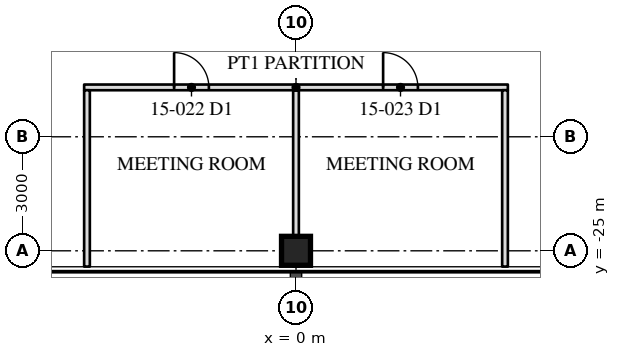
"""IFC4 building model, lengths in metres.
Left out: names, types, materials, properties, quantities, classifications, styles, units other than length and angle.
Written with IfcOpenShell. Run it as: python <this file> out.ifc"""

import sys

from ifc_helpers import new_model, si_unit, direction, frame, frame_2d, origin, origin_2d, place, context, subcontext, project, spatial, rectangle, hollow_rectangle, extrude, element, fill, save


model = new_model("IFC4")
c1 = context("Model", 3, precision=1e-05, world=origin(), true_north=direction((0.0, 1.0)))
c2 = subcontext(c1, "Body", "Model", "MODEL_VIEW")
j1 = project(units=[si_unit("LENGTHUNIT", "METRE"), si_unit("PLANEANGLEUNIT", "RADIAN")], contexts=[c1])
p1 = place(None, origin())
s1 = spatial("IfcSite", under=j1, at=p1, CompositionType="ELEMENT")
p2 = place(p1, origin())
s2 = spatial("IfcBuilding", under=s1, at=p2, CompositionType="ELEMENT")
p3 = place(p2, frame((0.0, 0.0, 65.2)))
s3 = spatial("IfcBuildingStorey", under=s2, at=p3, CompositionType="ELEMENT", Elevation=65.2)
p4 = place(p3, frame((0.0, -25.0, 0.0), z_axis=(0.0, 0.0, 1.0), x_axis=(1.0, 0.0, 0.0)))
e1 = element("IfcColumn", 1, at=p4, inside=s3, PredefinedType="COLUMN", context=c2, shape_type="SweptSolid", body=[
    extrude(hollow_rectangle(XDim=0.762, YDim=0.762, WallThickness=0.127, at=origin_2d()), origin(), (0.0, 0.0, 1.0), 4.1),
])
p5 = place(p3, frame((-5.575, -20.7, 0.0), z_axis=(0.0, 0.0, 1.0), x_axis=(1.0, 0.0, 0.0)))
e2 = element("IfcWall", 2, at=p5, inside=s3, PredefinedType="PARTITIONING", context=c2, shape_type="SweptSolid", body=[
    extrude(rectangle(XDim=11.15, YDim=0.15, at=frame_2d((5.575, 0.0))), origin(), (0.0, 0.0, 1.0), 3.91),
])
p6 = place(p5, frame((2.367, 0.0, 0.0)))
e3 = element("IfcOpeningElement", 3, at=p6, cuts=e2, PredefinedType="OPENING", context=c2, shape_type="SweptSolid", body=[
    extrude(rectangle(XDim=0.915, YDim=2.134, at=frame_2d((0.458, 1.067))), frame((0.0, 0.085, 0.0), z_axis=(0.0, -1.0, 0.0), x_axis=(1.0, 0.0, 0.0)), (0.0, 0.0, 1.0), 0.17),
])
p7 = place(p5, frame((7.867, 0.0, 0.0)))
e4 = element("IfcOpeningElement", 4, at=p7, cuts=e2, PredefinedType="OPENING", context=c2, shape_type="SweptSolid", body=[
    extrude(rectangle(XDim=0.915, YDim=2.134, at=frame_2d((0.458, 1.067))), frame((0.0, 0.085, 0.0), z_axis=(0.0, -1.0, 0.0), x_axis=(1.0, 0.0, 0.0)), (0.0, 0.0, 1.0), 0.17),
])
p8 = place(p3, frame((-5.5, -20.775, 0.0), z_axis=(0.0, 0.0, 1.0), x_axis=(0.0, -1.0, 0.0)))
e5 = element("IfcWall", 5, at=p8, inside=s3, PredefinedType="PARTITIONING", context=c2, shape_type="SweptSolid", body=[
    extrude(rectangle(XDim=4.64, YDim=0.15, at=frame_2d((2.32, 0.0))), origin(), (0.0, 0.0, 1.0), 3.91),
])
p9 = place(p3, frame((0.0, -20.775, 0.0), z_axis=(0.0, 0.0, 1.0), x_axis=(0.0, -1.0, 0.0)))
e6 = element("IfcWall", 6, at=p9, inside=s3, PredefinedType="PARTITIONING", context=c2, shape_type="SweptSolid", body=[
    extrude(rectangle(XDim=4.64, YDim=0.15, at=frame_2d((2.32, 0.0))), origin(), (0.0, 0.0, 1.0), 3.13),
])
p10 = place(p3, frame((5.5, -20.775, 0.0), z_axis=(0.0, 0.0, 1.0), x_axis=(0.0, -1.0, 0.0)))
e7 = element("IfcWall", 7, at=p10, inside=s3, PredefinedType="PARTITIONING", context=c2, shape_type="SweptSolid", body=[
    extrude(rectangle(XDim=4.64, YDim=0.15, at=frame_2d((2.32, 0.0))), origin(), (0.0, 0.0, 1.0), 3.91),
])
p11 = place(p6, origin())
e8 = element("IfcDoor", 8, at=p11, inside=s3, OperationType="SINGLE_SWING_LEFT", PredefinedType="DOOR", context=c2, shape_type="SweptSolid", body=[
    extrude(rectangle(XDim=0.915, YDim=2.134, at=frame_2d((0.458, 1.067))), frame((0.0, 0.025, 0.0), z_axis=(0.0, -1.0, 0.0), x_axis=(1.0, 0.0, 0.0)), (0.0, 0.0, 1.0), 0.05),
])
fill(e3, e8)
p12 = place(p7, origin())
e9 = element("IfcDoor", 9, at=p12, inside=s3, OperationType="SINGLE_SWING_LEFT", PredefinedType="DOOR", context=c2, shape_type="SweptSolid", body=[
    extrude(rectangle(XDim=0.915, YDim=2.134, at=frame_2d((0.458, 1.067))), frame((0.0, 0.025, 0.0), z_axis=(0.0, -1.0, 0.0), x_axis=(1.0, 0.0, 0.0)), (0.0, 0.0, 1.0), 0.05),
])
fill(e4, e9)
save(model, sys.argv[1])
